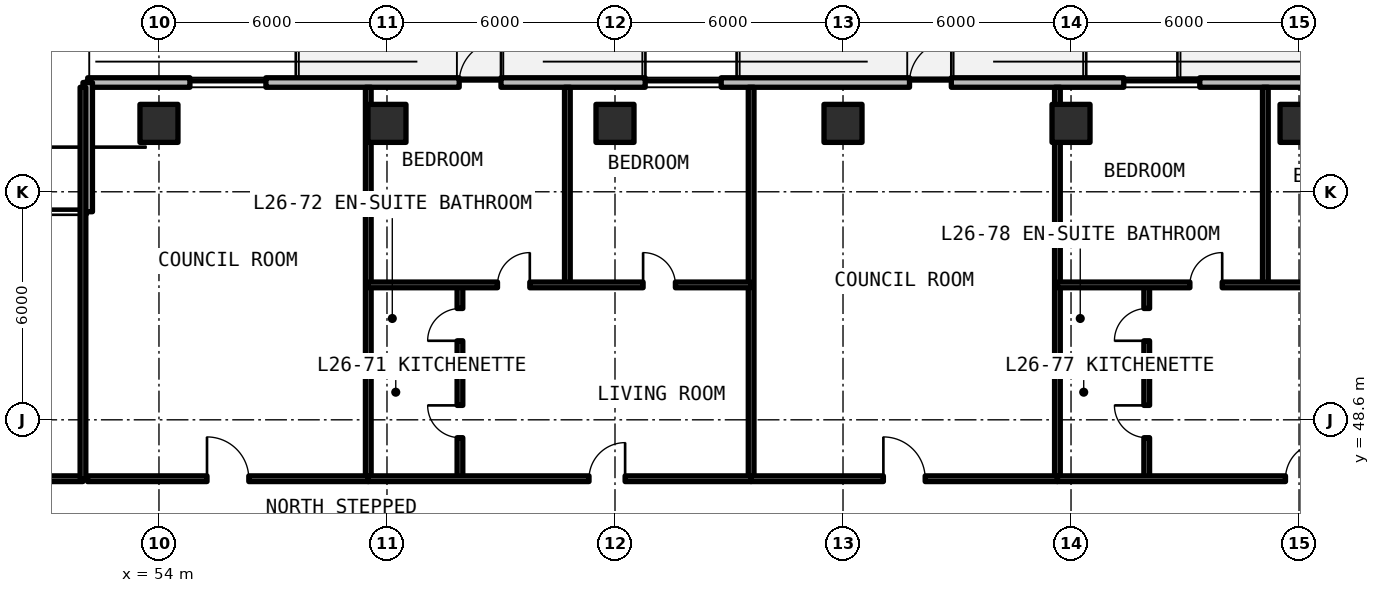
"""IFC4 building model, lengths in metres.
Left out: names, types, materials, properties, quantities, classifications, styles, units other than length and angle.
Written with IfcOpenShell. Run it as: python <this file> out.ifc"""

import sys

from ifc_helpers import new_model, si_unit, direction, frame, frame_2d, origin, origin_2d, place, context, subcontext, project, spatial, rectangle, extrude, element, fill, save


model = new_model("IFC4")
c1 = context("Model", 3, precision=1e-05, world=origin(), true_north=direction((0.0, 1.0)))
c2 = subcontext(c1, "Body", "Model", "MODEL_VIEW")
j1 = project(units=[si_unit("LENGTHUNIT", "METRE"), si_unit("PLANEANGLEUNIT", "RADIAN")], contexts=[c1])
p1 = place(None, origin())
s1 = spatial("IfcSite", under=j1, at=p1, CompositionType="ELEMENT")
p2 = place(p1, origin())
s2 = spatial("IfcBuilding", under=s1, at=p2, CompositionType="ELEMENT")
p3 = place(p2, frame((0.0, 0.0, 95.37)))
s3 = spatial("IfcBuildingStorey", under=s2, at=p3, CompositionType="ELEMENT", Elevation=95.37)
for number, where, z_axis, x_axis in (
    (1, (54.0, 56.4, 0.0), (0.0, 0.0, 1.0), (1.0, 0.0, 0.0)),
    (2, (60.0, 56.4, 0.0), (0.0, 0.0, 1.0), (1.0, 0.0, 0.0)),
    (3, (66.0, 56.4, 0.0), (0.0, 0.0, 1.0), (1.0, 0.0, 0.0)),
    (4, (72.0, 56.4, 0.0), (0.0, 0.0, 1.0), (1.0, 0.0, 0.0)),
    (5, (78.0, 56.4, 0.0), (0.0, 0.0, 1.0), (1.0, 0.0, 0.0)),
    (6, (84.0, 56.4, 0.0), (0.0, 0.0, 1.0), (1.0, 0.0, 0.0)),
):
    element("IfcColumn", number, at=place(p3, frame(where, z_axis=z_axis, x_axis=x_axis)), inside=s3, PredefinedType="COLUMN", context=c2, shape_type="SweptSolid", body=[
        extrude(rectangle(XDim=1.0, YDim=1.0, at=origin_2d()), origin(), (0.0, 0.0, 1.0), 3.3),
    ])
p4 = place(p3, frame((96.148, 57.475, 0.0), z_axis=(0.0, 0.0, 1.0), x_axis=(-1.0, 0.0, 0.0)))
e7 = element("IfcWall", 7, at=p4, inside=s3, PredefinedType="SOLIDWALL", context=c2, shape_type="SweptSolid", body=[
    extrude(rectangle(XDim=44.023, YDim=0.25, at=frame_2d((22.012, 0.0))), origin(), (0.0, 0.0, 1.0), 3.08),
])
p5 = place(p4, frame((33.148, 0.0, 0.0)))
e8 = element("IfcOpeningElement", 8, at=p5, cuts=e7, PredefinedType="OPENING", context=c2, shape_type="SweptSolid", body=[
    extrude(rectangle(XDim=1.1, YDim=2.15, at=frame_2d((0.55, 1.075))), frame((0.0, 0.135, 0.0), z_axis=(0.0, -1.0, 0.0), x_axis=(1.0, 0.0, 0.0)), (0.0, 0.0, 1.0), 0.27),
])
p6 = place(p4, frame((21.298, 0.0, 0.0)))
e9 = element("IfcOpeningElement", 9, at=p6, cuts=e7, PredefinedType="OPENING", context=c2, shape_type="SweptSolid", body=[
    extrude(rectangle(XDim=1.1, YDim=2.15, at=frame_2d((0.55, 1.075))), frame((0.0, 0.135, 0.0), z_axis=(0.0, -1.0, 0.0), x_axis=(1.0, 0.0, 0.0)), (0.0, 0.0, 1.0), 0.27),
])
p7 = place(p4, frame((9.198, 0.0, 0.0)))
e10 = element("IfcOpeningElement", 10, at=p7, cuts=e7, PredefinedType="OPENING", context=c2, shape_type="SweptSolid", body=[
    extrude(rectangle(XDim=1.1, YDim=2.15, at=frame_2d((0.55, 1.075))), frame((0.0, 0.135, 0.0), z_axis=(0.0, -1.0, 0.0), x_axis=(1.0, 0.0, 0.0)), (0.0, 0.0, 1.0), 0.27),
])
p8 = place(p4, frame((39.334, 0.0, 0.78)))
e11 = element("IfcOpeningElement", 11, at=p8, cuts=e7, PredefinedType="OPENING", context=c2, shape_type="SweptSolid", body=[
    extrude(rectangle(XDim=2.0, YDim=1.66, at=frame_2d((1.0, 0.83))), frame((0.0, 0.135, 0.0), z_axis=(0.0, -1.0, 0.0), x_axis=(1.0, 0.0, 0.0)), (0.0, 0.0, 1.0), 0.27),
])
p9 = place(p4, frame((27.354, 0.0, 0.78)))
e12 = element("IfcOpeningElement", 12, at=p9, cuts=e7, PredefinedType="OPENING", context=c2, shape_type="SweptSolid", body=[
    extrude(rectangle(XDim=2.0, YDim=1.66, at=frame_2d((1.0, 0.83))), frame((0.0, 0.135, 0.0), z_axis=(0.0, -1.0, 0.0), x_axis=(1.0, 0.0, 0.0)), (0.0, 0.0, 1.0), 0.27),
])
p10 = place(p4, frame((14.76, 0.0, 0.78)))
e13 = element("IfcOpeningElement", 13, at=p10, cuts=e7, PredefinedType="OPENING", context=c2, shape_type="SweptSolid", body=[
    extrude(rectangle(XDim=2.0, YDim=1.66, at=frame_2d((1.0, 0.83))), frame((0.0, 0.135, 0.0), z_axis=(0.0, -1.0, 0.0), x_axis=(1.0, 0.0, 0.0)), (0.0, 0.0, 1.0), 0.27),
])
p11 = place(p4, frame((3.066, 0.0, 0.78)))
e14 = element("IfcOpeningElement", 14, at=p11, cuts=e7, PredefinedType="OPENING", context=c2, shape_type="SweptSolid", body=[
    extrude(rectangle(XDim=2.0, YDim=1.66, at=frame_2d((1.0, 0.83))), frame((0.0, 0.135, 0.0), z_axis=(0.0, -1.0, 0.0), x_axis=(1.0, 0.0, 0.0)), (0.0, 0.0, 1.0), 0.27),
])
p12 = place(p3, frame((52.125, 57.475, 0.0), z_axis=(0.0, 0.0, 1.0), x_axis=(0.0, -1.0, 0.0)))
e15 = element("IfcWall", 15, at=p12, inside=s3, PredefinedType="SOLIDWALL", context=c2, shape_type="SweptSolid", body=[
    extrude(rectangle(XDim=3.4, YDim=0.25, at=frame_2d((1.7, 0.0))), origin(), (0.0, 0.0, 1.0), 3.08),
])
p13 = place(p3, frame((43.6, 47.05, 0.0), z_axis=(0.0, 0.0, 1.0), x_axis=(1.0, 0.0, 0.0)))
e16 = element("IfcWall", 16, at=p13, inside=s3, PredefinedType="SOLIDWALL", context=c2, shape_type="SweptSolid", body=[
    extrude(rectangle(XDim=8.4, YDim=0.15, at=frame_2d((4.2, 0.0))), origin(), (0.0, 0.0, 1.0), 2.35),
])
p14 = place(p13, frame((3.65, 0.0, 0.0)))
e17 = element("IfcOpeningElement", 17, at=p14, cuts=e16, PredefinedType="OPENING", context=c2, shape_type="SweptSolid", body=[
    extrude(rectangle(XDim=1.1, YDim=2.15, at=frame_2d((0.55, 1.075))), frame((0.0, 0.085, 0.0), z_axis=(0.0, -1.0, 0.0), x_axis=(1.0, 0.0, 0.0)), (0.0, 0.0, 1.0), 0.17),
])
for number, where, z_axis, x_axis in (
    (18, (52.0, 47.05, 0.0), (0.0, 0.0, 1.0), (0.0, 1.0, 0.0)),
    (19, (59.508, 47.05, 0.0), (0.0, 0.0, 1.0), (0.0, 1.0, 0.0)),
):
    element("IfcWall", number, at=place(p3, frame(where, z_axis=z_axis, x_axis=x_axis)), inside=s3, PredefinedType="SOLIDWALL", context=c2, shape_type="SweptSolid", body=[
        extrude(rectangle(XDim=10.3, YDim=0.15, at=frame_2d((5.15, 0.0))), origin(), (0.0, 0.0, 1.0), 2.35),
    ])
p15 = place(p3, frame((52.12, 47.05, 0.0), z_axis=(0.0, 0.0, 1.0), x_axis=(1.0, 0.0, 0.0)))
e20 = element("IfcWall", 20, at=p15, inside=s3, PredefinedType="SOLIDWALL", context=c2, shape_type="SweptSolid", body=[
    extrude(rectangle(XDim=7.388, YDim=0.15, at=frame_2d((3.694, 0.0))), origin(), (0.0, 0.0, 1.0), 2.35),
])
p16 = place(p15, frame((3.144, 0.0, 0.0)))
e21 = element("IfcOpeningElement", 21, at=p16, cuts=e20, PredefinedType="OPENING", context=c2, shape_type="SweptSolid", body=[
    extrude(rectangle(XDim=1.1, YDim=2.15, at=frame_2d((0.55, 1.075))), frame((0.0, 0.085, 0.0), z_axis=(0.0, -1.0, 0.0), x_axis=(1.0, 0.0, 0.0)), (0.0, 0.0, 1.0), 0.17),
])
p17 = place(p3, frame((69.583, 47.05, 0.0), z_axis=(0.0, 0.0, 1.0), x_axis=(0.0, 1.0, 0.0)))
e22 = element("IfcWall", 22, at=p17, inside=s3, PredefinedType="SOLIDWALL", context=c2, shape_type="SweptSolid", body=[
    extrude(rectangle(XDim=10.3, YDim=0.15, at=frame_2d((5.15, 0.0))), origin(), (0.0, 0.0, 1.0), 2.35),
])
p18 = place(p3, frame((59.508, 50.059, 0.0), z_axis=(0.0, 0.0, 1.0), x_axis=(1.0, 0.0, 0.0)))
e23 = element("IfcWall", 23, at=p18, inside=s3, PredefinedType="PARTITIONING", context=c2, shape_type="SweptSolid", body=[
    extrude(rectangle(XDim=2.412, YDim=0.15, at=frame_2d((1.206, 0.0))), origin(), (0.0, 0.0, 1.0), 2.35),
])
p19 = place(p3, frame((61.92, 47.05, 0.0), z_axis=(0.0, 0.0, 1.0), x_axis=(0.0, 1.0, 0.0)))
e24 = element("IfcWall", 24, at=p19, inside=s3, PredefinedType="PARTITIONING", context=c2, shape_type="SweptSolid", body=[
    extrude(rectangle(XDim=5.1, YDim=0.15, at=frame_2d((2.55, 0.0))), origin(), (0.0, 0.0, 1.0), 2.35),
])
p20 = place(p19, frame((1.08, 0.0, 0.0)))
e25 = element("IfcOpeningElement", 25, at=p20, cuts=e24, PredefinedType="OPENING", context=c2, shape_type="SweptSolid", body=[
    extrude(rectangle(XDim=0.85, YDim=2.1, at=frame_2d((0.425, 1.05))), frame((0.0, 0.085, 0.0), z_axis=(0.0, -1.0, 0.0), x_axis=(1.0, 0.0, 0.0)), (0.0, 0.0, 1.0), 0.17),
])
p21 = place(p19, frame((3.629, 0.0, 0.0)))
e26 = element("IfcOpeningElement", 26, at=p21, cuts=e24, PredefinedType="OPENING", context=c2, shape_type="SweptSolid", body=[
    extrude(rectangle(XDim=0.85, YDim=2.1, at=frame_2d((0.425, 1.05))), frame((0.0, 0.085, 0.0), z_axis=(0.0, -1.0, 0.0), x_axis=(1.0, 0.0, 0.0)), (0.0, 0.0, 1.0), 0.17),
])
p22 = place(p3, frame((64.747, 52.15, 0.0), z_axis=(0.0, 0.0, 1.0), x_axis=(0.0, 1.0, 0.0)))
e27 = element("IfcWall", 27, at=p22, inside=s3, PredefinedType="PARTITIONING", context=c2, shape_type="SweptSolid", body=[
    extrude(rectangle(XDim=5.2, YDim=0.15, at=frame_2d((2.6, 0.0))), origin(), (0.0, 0.0, 1.0), 2.35),
])
p23 = place(p3, frame((59.508, 52.15, 0.0), z_axis=(0.0, 0.0, 1.0), x_axis=(1.0, 0.0, 0.0)))
e28 = element("IfcWall", 28, at=p23, inside=s3, PredefinedType="PARTITIONING", context=c2, shape_type="SweptSolid", body=[
    extrude(rectangle(XDim=10.074, YDim=0.15, at=frame_2d((5.037, 0.0))), origin(), (0.0, 0.0, 1.0), 2.35),
])
p24 = place(p23, frame((3.4, 0.0, 0.0)))
e29 = element("IfcOpeningElement", 29, at=p24, cuts=e28, PredefinedType="OPENING", context=c2, shape_type="SweptSolid", body=[
    extrude(rectangle(XDim=0.85, YDim=2.1, at=frame_2d((0.425, 1.05))), frame((0.0, 0.085, 0.0), z_axis=(0.0, -1.0, 0.0), x_axis=(1.0, 0.0, 0.0)), (0.0, 0.0, 1.0), 0.17),
])
p25 = place(p23, frame((7.232, 0.0, 0.0)))
e30 = element("IfcOpeningElement", 30, at=p25, cuts=e28, PredefinedType="OPENING", context=c2, shape_type="SweptSolid", body=[
    extrude(rectangle(XDim=0.85, YDim=2.1, at=frame_2d((0.425, 1.05))), frame((0.0, 0.085, 0.0), z_axis=(0.0, -1.0, 0.0), x_axis=(1.0, 0.0, 0.0)), (0.0, 0.0, 1.0), 0.17),
])
p26 = place(p3, frame((59.508, 47.05, 0.0), z_axis=(0.0, 0.0, 1.0), x_axis=(1.0, 0.0, 0.0)))
e31 = element("IfcWall", 31, at=p26, inside=s3, PredefinedType="SOLIDWALL", context=c2, shape_type="SweptSolid", body=[
    extrude(rectangle(XDim=10.074, YDim=0.15, at=frame_2d((5.037, 0.0))), origin(), (0.0, 0.0, 1.0), 2.35),
])
p27 = place(p26, frame((5.808, 0.0, 0.0)))
e32 = element("IfcOpeningElement", 32, at=p27, cuts=e31, PredefinedType="OPENING", context=c2, shape_type="SweptSolid", body=[
    extrude(rectangle(XDim=0.95, YDim=2.15, at=frame_2d((0.475, 1.075))), frame((0.0, 0.085, 0.0), z_axis=(0.0, -1.0, 0.0), x_axis=(1.0, 0.0, 0.0)), (0.0, 0.0, 1.0), 0.17),
])
p28 = place(p3, frame((77.642, 47.05, 0.0), z_axis=(0.0, 0.0, 1.0), x_axis=(0.0, 1.0, 0.0)))
e33 = element("IfcWall", 33, at=p28, inside=s3, PredefinedType="SOLIDWALL", context=c2, shape_type="SweptSolid", body=[
    extrude(rectangle(XDim=10.3, YDim=0.15, at=frame_2d((5.15, 0.0))), origin(), (0.0, 0.0, 1.0), 2.35),
])
p29 = place(p3, frame((69.583, 47.05, 0.0), z_axis=(0.0, 0.0, 1.0), x_axis=(1.0, 0.0, 0.0)))
e34 = element("IfcWall", 34, at=p29, inside=s3, PredefinedType="SOLIDWALL", context=c2, shape_type="SweptSolid", body=[
    extrude(rectangle(XDim=8.06, YDim=0.15, at=frame_2d((4.03, 0.0))), origin(), (0.0, 0.0, 1.0), 2.35),
])
p30 = place(p29, frame((3.48, 0.0, 0.0)))
e35 = element("IfcOpeningElement", 35, at=p30, cuts=e34, PredefinedType="OPENING", context=c2, shape_type="SweptSolid", body=[
    extrude(rectangle(XDim=1.1, YDim=2.15, at=frame_2d((0.55, 1.075))), frame((0.0, 0.085, 0.0), z_axis=(0.0, -1.0, 0.0), x_axis=(1.0, 0.0, 0.0)), (0.0, 0.0, 1.0), 0.17),
])
p31 = place(p3, frame((77.642, 50.059, 0.0), z_axis=(0.0, 0.0, 1.0), x_axis=(1.0, 0.0, 0.0)))
e36 = element("IfcWall", 36, at=p31, inside=s3, PredefinedType="PARTITIONING", context=c2, shape_type="SweptSolid", body=[
    extrude(rectangle(XDim=2.35, YDim=0.15, at=frame_2d((1.175, 0.0))), origin(), (0.0, 0.0, 1.0), 2.35),
])
p32 = place(p3, frame((79.992, 47.05, 0.0), z_axis=(0.0, 0.0, 1.0), x_axis=(0.0, 1.0, 0.0)))
e37 = element("IfcWall", 37, at=p32, inside=s3, PredefinedType="PARTITIONING", context=c2, shape_type="SweptSolid", body=[
    extrude(rectangle(XDim=5.1, YDim=0.15, at=frame_2d((2.55, 0.0))), origin(), (0.0, 0.0, 1.0), 2.35),
])
p33 = place(p32, frame((1.08, 0.0, 0.0)))
e38 = element("IfcOpeningElement", 38, at=p33, cuts=e37, PredefinedType="OPENING", context=c2, shape_type="SweptSolid", body=[
    extrude(rectangle(XDim=0.85, YDim=2.1, at=frame_2d((0.425, 1.05))), frame((0.0, 0.085, 0.0), z_axis=(0.0, -1.0, 0.0), x_axis=(1.0, 0.0, 0.0)), (0.0, 0.0, 1.0), 0.17),
])
p34 = place(p32, frame((3.629, 0.0, 0.0)))
e39 = element("IfcOpeningElement", 39, at=p34, cuts=e37, PredefinedType="OPENING", context=c2, shape_type="SweptSolid", body=[
    extrude(rectangle(XDim=0.85, YDim=2.1, at=frame_2d((0.425, 1.05))), frame((0.0, 0.085, 0.0), z_axis=(0.0, -1.0, 0.0), x_axis=(1.0, 0.0, 0.0)), (0.0, 0.0, 1.0), 0.17),
])
p35 = place(p3, frame((83.114, 52.15, 0.0), z_axis=(0.0, 0.0, 1.0), x_axis=(0.0, 1.0, 0.0)))
e40 = element("IfcWall", 40, at=p35, inside=s3, PredefinedType="PARTITIONING", context=c2, shape_type="SweptSolid", body=[
    extrude(rectangle(XDim=5.2, YDim=0.15, at=frame_2d((2.6, 0.0))), origin(), (0.0, 0.0, 1.0), 2.35),
])
p36 = place(p3, frame((77.642, 52.15, 0.0), z_axis=(0.0, 0.0, 1.0), x_axis=(1.0, 0.0, 0.0)))
e41 = element("IfcWall", 41, at=p36, inside=s3, PredefinedType="PARTITIONING", context=c2, shape_type="SweptSolid", body=[
    extrude(rectangle(XDim=10.522, YDim=0.15, at=frame_2d((5.261, 0.0))), origin(), (0.0, 0.0, 1.0), 2.35),
])
p37 = place(p36, frame((3.486, 0.0, 0.0)))
e42 = element("IfcOpeningElement", 42, at=p37, cuts=e41, PredefinedType="OPENING", context=c2, shape_type="SweptSolid", body=[
    extrude(rectangle(XDim=0.85, YDim=2.1, at=frame_2d((0.425, 1.05))), frame((0.0, 0.085, 0.0), z_axis=(0.0, -1.0, 0.0), x_axis=(1.0, 0.0, 0.0)), (0.0, 0.0, 1.0), 0.17),
])
p38 = place(p36, frame((7.572, 0.0, 0.0)))
e43 = element("IfcOpeningElement", 43, at=p38, cuts=e41, PredefinedType="OPENING", context=c2, shape_type="SweptSolid", body=[
    extrude(rectangle(XDim=0.85, YDim=2.1, at=frame_2d((0.425, 1.05))), frame((0.0, 0.085, 0.0), z_axis=(0.0, -1.0, 0.0), x_axis=(1.0, 0.0, 0.0)), (0.0, 0.0, 1.0), 0.17),
])
p39 = place(p3, frame((77.642, 47.05, 0.0), z_axis=(0.0, 0.0, 1.0), x_axis=(1.0, 0.0, 0.0)))
e44 = element("IfcWall", 44, at=p39, inside=s3, PredefinedType="SOLIDWALL", context=c2, shape_type="SweptSolid", body=[
    extrude(rectangle(XDim=10.522, YDim=0.15, at=frame_2d((5.261, 0.0))), origin(), (0.0, 0.0, 1.0), 2.35),
])
p40 = place(p39, frame((6.001, 0.0, 0.0)))
e45 = element("IfcOpeningElement", 45, at=p40, cuts=e44, PredefinedType="OPENING", context=c2, shape_type="SweptSolid", body=[
    extrude(rectangle(XDim=0.95, YDim=2.15, at=frame_2d((0.475, 1.075))), frame((0.0, 0.085, 0.0), z_axis=(0.0, -1.0, 0.0), x_axis=(1.0, 0.0, 0.0)), (0.0, 0.0, 1.0), 0.17),
])
p41 = place(p5, frame((1.1, 0.0, 0.0), z_axis=(0.0, 0.0, 1.0), x_axis=(-1.0, 0.0, 0.0)))
e46 = element("IfcDoor", 46, at=p41, inside=s3, OperationType="SINGLE_SWING_LEFT", PredefinedType="DOOR", context=c2, shape_type="SweptSolid", body=[
    extrude(rectangle(XDim=1.1, YDim=2.15, at=frame_2d((0.55, 1.075))), frame((0.0, 0.025, 0.0), z_axis=(0.0, -1.0, 0.0), x_axis=(1.0, 0.0, 0.0)), (0.0, 0.0, 1.0), 0.05),
])
fill(e8, e46)
p42 = place(p6, frame((1.1, 0.0, 0.0), z_axis=(0.0, 0.0, 1.0), x_axis=(-1.0, 0.0, 0.0)))
e47 = element("IfcDoor", 47, at=p42, inside=s3, OperationType="SINGLE_SWING_RIGHT", PredefinedType="DOOR", context=c2, shape_type="SweptSolid", body=[
    extrude(rectangle(XDim=1.1, YDim=2.15, at=frame_2d((0.55, 1.075))), frame((0.0, 0.025, 0.0), z_axis=(0.0, -1.0, 0.0), x_axis=(1.0, 0.0, 0.0)), (0.0, 0.0, 1.0), 0.05),
])
fill(e9, e47)
p43 = place(p8, origin())
e48 = element("IfcWindow", 48, at=p43, inside=s3, PartitioningType="SINGLE_PANEL", PredefinedType="WINDOW", context=c2, shape_type="SweptSolid", body=[
    extrude(rectangle(XDim=2.0, YDim=1.66, at=frame_2d((1.0, 0.83))), frame((0.0, 0.03, 0.0), z_axis=(0.0, -1.0, 0.0), x_axis=(1.0, 0.0, 0.0)), (0.0, 0.0, 1.0), 0.06),
])
fill(e11, e48)
p44 = place(p9, origin())
e49 = element("IfcWindow", 49, at=p44, inside=s3, PartitioningType="SINGLE_PANEL", PredefinedType="WINDOW", context=c2, shape_type="SweptSolid", body=[
    extrude(rectangle(XDim=2.0, YDim=1.66, at=frame_2d((1.0, 0.83))), frame((0.0, 0.03, 0.0), z_axis=(0.0, -1.0, 0.0), x_axis=(1.0, 0.0, 0.0)), (0.0, 0.0, 1.0), 0.06),
])
fill(e12, e49)
p45 = place(p10, origin())
e50 = element("IfcWindow", 50, at=p45, inside=s3, PartitioningType="SINGLE_PANEL", PredefinedType="WINDOW", context=c2, shape_type="SweptSolid", body=[
    extrude(rectangle(XDim=2.0, YDim=1.66, at=frame_2d((1.0, 0.83))), frame((0.0, 0.03, 0.0), z_axis=(0.0, -1.0, 0.0), x_axis=(1.0, 0.0, 0.0)), (0.0, 0.0, 1.0), 0.06),
])
fill(e13, e50)
p46 = place(p16, origin())
e51 = element("IfcDoor", 51, at=p46, inside=s3, OperationType="SINGLE_SWING_LEFT", PredefinedType="DOOR", context=c2, shape_type="SweptSolid", body=[
    extrude(rectangle(XDim=1.1, YDim=2.15, at=frame_2d((0.55, 1.075))), frame((0.0, 0.025, 0.0), z_axis=(0.0, -1.0, 0.0), x_axis=(1.0, 0.0, 0.0)), (0.0, 0.0, 1.0), 0.05),
])
fill(e21, e51)
p47 = place(p20, origin())
e52 = element("IfcDoor", 52, at=p47, inside=s3, OperationType="SINGLE_SWING_RIGHT", PredefinedType="DOOR", context=c2, shape_type="SweptSolid", body=[
    extrude(rectangle(XDim=0.85, YDim=2.1, at=frame_2d((0.425, 1.05))), frame((0.0, 0.025, 0.0), z_axis=(0.0, -1.0, 0.0), x_axis=(1.0, 0.0, 0.0)), (0.0, 0.0, 1.0), 0.05),
])
fill(e25, e52)
p48 = place(p21, origin())
e53 = element("IfcDoor", 53, at=p48, inside=s3, OperationType="SINGLE_SWING_LEFT", PredefinedType="DOOR", context=c2, shape_type="SweptSolid", body=[
    extrude(rectangle(XDim=0.85, YDim=2.1, at=frame_2d((0.425, 1.05))), frame((0.0, 0.025, 0.0), z_axis=(0.0, -1.0, 0.0), x_axis=(1.0, 0.0, 0.0)), (0.0, 0.0, 1.0), 0.05),
])
fill(e26, e53)
p49 = place(p24, origin())
e54 = element("IfcDoor", 54, at=p49, inside=s3, OperationType="SINGLE_SWING_RIGHT", PredefinedType="DOOR", context=c2, shape_type="SweptSolid", body=[
    extrude(rectangle(XDim=0.85, YDim=2.1, at=frame_2d((0.425, 1.05))), frame((0.0, 0.025, 0.0), z_axis=(0.0, -1.0, 0.0), x_axis=(1.0, 0.0, 0.0)), (0.0, 0.0, 1.0), 0.05),
])
fill(e29, e54)
p50 = place(p25, origin())
e55 = element("IfcDoor", 55, at=p50, inside=s3, OperationType="SINGLE_SWING_LEFT", PredefinedType="DOOR", context=c2, shape_type="SweptSolid", body=[
    extrude(rectangle(XDim=0.85, YDim=2.1, at=frame_2d((0.425, 1.05))), frame((0.0, 0.025, 0.0), z_axis=(0.0, -1.0, 0.0), x_axis=(1.0, 0.0, 0.0)), (0.0, 0.0, 1.0), 0.05),
])
fill(e30, e55)
p51 = place(p27, origin())
e56 = element("IfcDoor", 56, at=p51, inside=s3, OperationType="SINGLE_SWING_RIGHT", PredefinedType="DOOR", context=c2, shape_type="SweptSolid", body=[
    extrude(rectangle(XDim=0.95, YDim=2.15, at=frame_2d((0.475, 1.075))), frame((0.0, 0.025, 0.0), z_axis=(0.0, -1.0, 0.0), x_axis=(1.0, 0.0, 0.0)), (0.0, 0.0, 1.0), 0.05),
])
fill(e32, e56)
p52 = place(p30, origin())
e57 = element("IfcDoor", 57, at=p52, inside=s3, OperationType="SINGLE_SWING_LEFT", PredefinedType="DOOR", context=c2, shape_type="SweptSolid", body=[
    extrude(rectangle(XDim=1.1, YDim=2.15, at=frame_2d((0.55, 1.075))), frame((0.0, 0.025, 0.0), z_axis=(0.0, -1.0, 0.0), x_axis=(1.0, 0.0, 0.0)), (0.0, 0.0, 1.0), 0.05),
])
fill(e35, e57)
p53 = place(p33, origin())
e58 = element("IfcDoor", 58, at=p53, inside=s3, OperationType="SINGLE_SWING_RIGHT", PredefinedType="DOOR", context=c2, shape_type="SweptSolid", body=[
    extrude(rectangle(XDim=0.85, YDim=2.1, at=frame_2d((0.425, 1.05))), frame((0.0, 0.025, 0.0), z_axis=(0.0, -1.0, 0.0), x_axis=(1.0, 0.0, 0.0)), (0.0, 0.0, 1.0), 0.05),
])
fill(e38, e58)
p54 = place(p34, origin())
e59 = element("IfcDoor", 59, at=p54, inside=s3, OperationType="SINGLE_SWING_LEFT", PredefinedType="DOOR", context=c2, shape_type="SweptSolid", body=[
    extrude(rectangle(XDim=0.85, YDim=2.1, at=frame_2d((0.425, 1.05))), frame((0.0, 0.025, 0.0), z_axis=(0.0, -1.0, 0.0), x_axis=(1.0, 0.0, 0.0)), (0.0, 0.0, 1.0), 0.05),
])
fill(e39, e59)
p55 = place(p37, origin())
e60 = element("IfcDoor", 60, at=p55, inside=s3, OperationType="SINGLE_SWING_RIGHT", PredefinedType="DOOR", context=c2, shape_type="SweptSolid", body=[
    extrude(rectangle(XDim=0.85, YDim=2.1, at=frame_2d((0.425, 1.05))), frame((0.0, 0.025, 0.0), z_axis=(0.0, -1.0, 0.0), x_axis=(1.0, 0.0, 0.0)), (0.0, 0.0, 1.0), 0.05),
])
fill(e42, e60)
p56 = place(p40, origin())
e61 = element("IfcDoor", 61, at=p56, inside=s3, OperationType="SINGLE_SWING_RIGHT", PredefinedType="DOOR", context=c2, shape_type="SweptSolid", body=[
    extrude(rectangle(XDim=0.95, YDim=2.15, at=frame_2d((0.475, 1.075))), frame((0.0, 0.025, 0.0), z_axis=(0.0, -1.0, 0.0), x_axis=(1.0, 0.0, 0.0)), (0.0, 0.0, 1.0), 0.05),
])
fill(e45, e61)
save(model, sys.argv[1])
